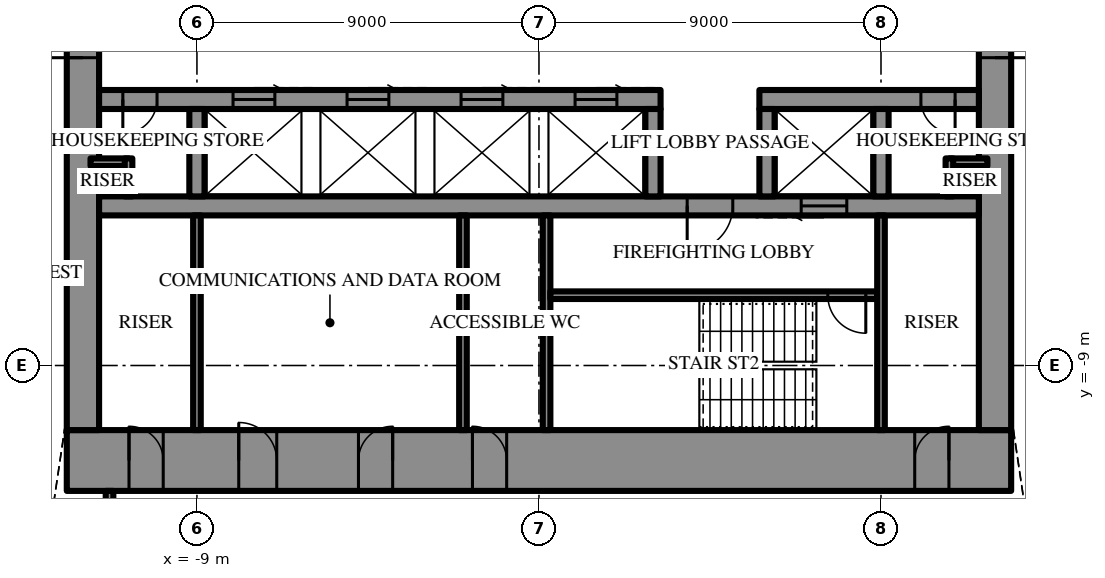
"""IFC4 building model, lengths in metres.
Left out: names, types, materials, properties, quantities, classifications, styles, units other than length and angle.
Written with IfcOpenShell. Run it as: python <this file> out.ifc"""

import sys

from ifc_helpers import new_model, si_unit, direction, frame, frame_2d, origin, place, context, subcontext, project, spatial, rectangle, extrude, element, fill, save


model = new_model("IFC4")
c1 = context("Model", 3, precision=1e-05, world=origin(), true_north=direction((0.0, 1.0)))
c2 = subcontext(c1, "Body", "Model", "MODEL_VIEW")
j1 = project(units=[si_unit("LENGTHUNIT", "METRE"), si_unit("PLANEANGLEUNIT", "RADIAN")], contexts=[c1])
p1 = place(None, origin())
s1 = spatial("IfcSite", under=j1, at=p1, CompositionType="ELEMENT")
p2 = place(p1, origin())
s2 = spatial("IfcBuilding", under=s1, at=p2, CompositionType="ELEMENT")
p3 = place(p2, frame((0.0, 0.0, 387.1)))
s3 = spatial("IfcBuildingStorey", under=s2, at=p3, CompositionType="ELEMENT", Elevation=387.1)
p4 = place(p3, frame((12.425, -11.5, 0.0), z_axis=(0.0, 0.0, 1.0), x_axis=(-1.0, 0.0, 0.0)))
e1 = element("IfcWall", 1, at=p4, inside=s3, PredefinedType="SHEAR", context=c2, shape_type="SweptSolid", body=[
    extrude(rectangle(XDim=24.85, YDim=1.6, at=frame_2d((12.425, 0.0))), origin(), (0.0, 0.0, 1.0), 4.2),
])
p5 = place(p4, frame((13.275, 0.0, 0.0)))
e2 = element("IfcOpeningElement", 2, at=p5, cuts=e1, PredefinedType="OPENING", context=c2, shape_type="SweptSolid", body=[
    extrude(rectangle(XDim=0.9, YDim=2.2, at=frame_2d((0.45, 1.1))), frame((0.0, 0.81, 0.0), z_axis=(0.0, -1.0, 0.0), x_axis=(1.0, 0.0, 0.0)), (0.0, 0.0, 1.0), 1.62),
])
p6 = place(p4, frame((16.275, 0.0, 0.0)))
e3 = element("IfcOpeningElement", 3, at=p6, cuts=e1, PredefinedType="OPENING", context=c2, shape_type="SweptSolid", body=[
    extrude(rectangle(XDim=0.9, YDim=2.2, at=frame_2d((0.45, 1.1))), frame((0.0, 0.81, 0.0), z_axis=(0.0, -1.0, 0.0), x_axis=(1.0, 0.0, 0.0)), (0.0, 0.0, 1.0), 1.62),
])
p7 = place(p4, frame((19.325, 0.0, 0.0)))
e4 = element("IfcOpeningElement", 4, at=p7, cuts=e1, PredefinedType="OPENING", context=c2, shape_type="SweptSolid", body=[
    extrude(rectangle(XDim=1.0, YDim=2.2, at=frame_2d((0.5, 1.1))), frame((0.0, 0.81, 0.0), z_axis=(0.0, -1.0, 0.0), x_axis=(1.0, 0.0, 0.0)), (0.0, 0.0, 1.0), 1.62),
])
p8 = place(p4, frame((1.637, 0.0, 0.0)))
e5 = element("IfcOpeningElement", 5, at=p8, cuts=e1, PredefinedType="OPENING", context=c2, shape_type="SweptSolid", body=[
    extrude(rectangle(XDim=0.9, YDim=2.2, at=frame_2d((0.45, 1.1))), frame((0.0, 0.81, 0.0), z_axis=(0.0, -1.0, 0.0), x_axis=(1.0, 0.0, 0.0)), (0.0, 0.0, 1.0), 1.62),
])
p9 = place(p4, frame((22.312, 0.0, 0.0)))
e6 = element("IfcOpeningElement", 6, at=p9, cuts=e1, PredefinedType="OPENING", context=c2, shape_type="SweptSolid", body=[
    extrude(rectangle(XDim=0.9, YDim=2.2, at=frame_2d((0.45, 1.1))), frame((0.0, 0.81, 0.0), z_axis=(0.0, -1.0, 0.0), x_axis=(1.0, 0.0, 0.0)), (0.0, 0.0, 1.0), 1.62),
])
p10 = place(p3, frame((12.0, -10.7, 0.0), z_axis=(0.0, 0.0, 1.0), x_axis=(0.0, 1.0, 0.0)))
e7 = element("IfcWall", 7, at=p10, inside=s3, PredefinedType="SHEAR", context=c2, shape_type="SweptSolid", body=[
    extrude(rectangle(XDim=21.4, YDim=0.85, at=frame_2d((10.7, 0.0))), origin(), (0.0, 0.0, 1.0), 4.2),
])
p11 = place(p10, frame((9.8, 0.0, 0.0)))
e8 = element("IfcOpeningElement", 8, at=p11, cuts=e7, PredefinedType="OPENING", context=c2, shape_type="SweptSolid", body=[
    extrude(rectangle(XDim=1.8, YDim=2.4, at=frame_2d((0.9, 1.2))), frame((0.0, 0.435, 0.0), z_axis=(0.0, -1.0, 0.0), x_axis=(1.0, 0.0, 0.0)), (0.0, 0.0, 1.0), 0.87),
])
p12 = place(p3, frame((-12.0, 10.7, 0.0), z_axis=(0.0, 0.0, 1.0), x_axis=(0.0, -1.0, 0.0)))
e9 = element("IfcWall", 9, at=p12, inside=s3, PredefinedType="SHEAR", context=c2, shape_type="SweptSolid", body=[
    extrude(rectangle(XDim=21.4, YDim=0.85, at=frame_2d((10.7, 0.0))), origin(), (0.0, 0.0, 1.0), 4.2),
])
p13 = place(p12, frame((9.8, 0.0, 0.0)))
e10 = element("IfcOpeningElement", 10, at=p13, cuts=e9, PredefinedType="OPENING", context=c2, shape_type="SweptSolid", body=[
    extrude(rectangle(XDim=1.8, YDim=2.4, at=frame_2d((0.9, 1.2))), frame((0.0, 0.435, 0.0), z_axis=(0.0, -1.0, 0.0), x_axis=(1.0, 0.0, 0.0)), (0.0, 0.0, 1.0), 0.87),
])
p14 = place(p3, frame((11.575, -2.0, 0.0), z_axis=(0.0, 0.0, 1.0), x_axis=(-1.0, 0.0, 0.0)))
e11 = element("IfcWall", 11, at=p14, inside=s3, PredefinedType="SHEAR", context=c2, shape_type="SweptSolid", body=[
    extrude(rectangle(XDim=5.775, YDim=0.5, at=frame_2d((2.887, 0.0))), origin(), (0.0, 0.0, 1.0), 4.2),
])
p15 = place(p14, frame((0.625, 0.0, 0.0)))
e12 = element("IfcOpeningElement", 12, at=p15, cuts=e11, PredefinedType="OPENING", context=c2, shape_type="SweptSolid", body=[
    extrude(rectangle(XDim=0.9, YDim=2.2, at=frame_2d((0.45, 1.1))), frame((0.0, 0.26, 0.0), z_axis=(0.0, -1.0, 0.0), x_axis=(1.0, 0.0, 0.0)), (0.0, 0.0, 1.0), 0.52),
])
p16 = place(p3, frame((3.2, -2.0, 0.0), z_axis=(0.0, 0.0, 1.0), x_axis=(-1.0, 0.0, 0.0)))
e13 = element("IfcWall", 13, at=p16, inside=s3, PredefinedType="SHEAR", context=c2, shape_type="SweptSolid", body=[
    extrude(rectangle(XDim=14.775, YDim=0.5, at=frame_2d((7.387, 0.0))), origin(), (0.0, 0.0, 1.0), 4.2),
])
p17 = place(p16, frame((13.25, 0.0, 0.0)))
e14 = element("IfcOpeningElement", 14, at=p17, cuts=e13, PredefinedType="OPENING", context=c2, shape_type="SweptSolid", body=[
    extrude(rectangle(XDim=0.9, YDim=2.2, at=frame_2d((0.45, 1.1))), frame((0.0, 0.26, 0.0), z_axis=(0.0, -1.0, 0.0), x_axis=(1.0, 0.0, 0.0)), (0.0, 0.0, 1.0), 0.52),
])
p18 = place(p16, frame((1.15, 0.0, 0.0)))
e15 = element("IfcOpeningElement", 15, at=p18, cuts=e13, PredefinedType="OPENING", context=c2, shape_type="SweptSolid", body=[
    extrude(rectangle(XDim=1.1, YDim=2.2, at=frame_2d((0.55, 1.1))), frame((0.0, 0.26, 0.0), z_axis=(0.0, -1.0, 0.0), x_axis=(1.0, 0.0, 0.0)), (0.0, 0.0, 1.0), 0.52),
])
p19 = place(p16, frame((4.15, 0.0, 0.0)))
e16 = element("IfcOpeningElement", 16, at=p19, cuts=e13, PredefinedType="OPENING", context=c2, shape_type="SweptSolid", body=[
    extrude(rectangle(XDim=1.1, YDim=2.2, at=frame_2d((0.55, 1.1))), frame((0.0, 0.26, 0.0), z_axis=(0.0, -1.0, 0.0), x_axis=(1.0, 0.0, 0.0)), (0.0, 0.0, 1.0), 0.52),
])
p20 = place(p16, frame((7.15, 0.0, 0.0)))
e17 = element("IfcOpeningElement", 17, at=p20, cuts=e13, PredefinedType="OPENING", context=c2, shape_type="SweptSolid", body=[
    extrude(rectangle(XDim=1.1, YDim=2.2, at=frame_2d((0.55, 1.1))), frame((0.0, 0.26, 0.0), z_axis=(0.0, -1.0, 0.0), x_axis=(1.0, 0.0, 0.0)), (0.0, 0.0, 1.0), 0.52),
])
p21 = place(p16, frame((10.15, 0.0, 0.0)))
e18 = element("IfcOpeningElement", 18, at=p21, cuts=e13, PredefinedType="OPENING", context=c2, shape_type="SweptSolid", body=[
    extrude(rectangle(XDim=1.1, YDim=2.2, at=frame_2d((0.55, 1.1))), frame((0.0, 0.26, 0.0), z_axis=(0.0, -1.0, 0.0), x_axis=(1.0, 0.0, 0.0)), (0.0, 0.0, 1.0), 0.52),
])
p22 = place(p3, frame((11.575, -4.8, 0.0), z_axis=(0.0, 0.0, 1.0), x_axis=(-1.0, 0.0, 0.0)))
e19 = element("IfcWall", 19, at=p22, inside=s3, PredefinedType="SHEAR", context=c2, shape_type="SweptSolid", body=[
    extrude(rectangle(XDim=23.15, YDim=0.5, at=frame_2d((11.575, 0.0))), origin(), (0.0, 0.0, 1.0), 4.2),
])
p23 = place(p22, frame((6.475, 0.0, 0.0)))
e20 = element("IfcOpeningElement", 20, at=p23, cuts=e19, PredefinedType="OPENING", context=c2, shape_type="SweptSolid", body=[
    extrude(rectangle(XDim=1.2, YDim=2.2, at=frame_2d((0.6, 1.1))), frame((0.0, 0.26, 0.0), z_axis=(0.0, -1.0, 0.0), x_axis=(1.0, 0.0, 0.0)), (0.0, 0.0, 1.0), 0.52),
])
p24 = place(p22, frame((3.475, 0.0, 0.0)))
e21 = element("IfcOpeningElement", 21, at=p24, cuts=e19, PredefinedType="OPENING", context=c2, shape_type="SweptSolid", body=[
    extrude(rectangle(XDim=1.2, YDim=2.2, at=frame_2d((0.6, 1.1))), frame((0.0, 0.26, 0.0), z_axis=(0.0, -1.0, 0.0), x_axis=(1.0, 0.0, 0.0)), (0.0, 0.0, 1.0), 0.52),
])
for number, where, z_axis, x_axis in (
    (22, (9.0, -2.25, 0.0), (0.0, 0.0, 1.0), (0.0, -1.0, 0.0)),
    (23, (6.0, -2.25, 0.0), (0.0, 0.0, 1.0), (0.0, -1.0, 0.0)),
    (24, (3.0, -2.25, 0.0), (0.0, 0.0, 1.0), (0.0, -1.0, 0.0)),
    (25, (-9.0, -2.25, 0.0), (0.0, 0.0, 1.0), (0.0, -1.0, 0.0)),
):
    element("IfcWall", number, at=place(p3, frame(where, z_axis=z_axis, x_axis=x_axis)), inside=s3, PredefinedType="SHEAR", context=c2, shape_type="SweptSolid", body=[
        extrude(rectangle(XDim=2.3, YDim=0.4, at=frame_2d((1.15, 0.0))), origin(), (0.0, 0.0, 1.0), 4.2),
    ])
p25 = place(p3, frame((0.2, -5.05, 0.0), z_axis=(0.0, 0.0, 1.0), x_axis=(0.0, -1.0, 0.0)))
e26 = element("IfcWall", 26, at=p25, inside=s3, PredefinedType="SHEAR", context=c2, shape_type="SweptSolid", body=[
    extrude(rectangle(XDim=5.65, YDim=0.2, at=frame_2d((2.825, 0.0))), origin(), (0.0, 0.0, 1.0), 4.2),
])
p26 = place(p3, frame((8.9, -7.15, 0.0), z_axis=(0.0, 0.0, 1.0), x_axis=(-1.0, 0.0, 0.0)))
e27 = element("IfcWall", 27, at=p26, inside=s3, PredefinedType="SHEAR", context=c2, shape_type="SweptSolid", body=[
    extrude(rectangle(XDim=8.6, YDim=0.2, at=frame_2d((4.3, 0.0))), origin(), (0.0, 0.0, 1.0), 4.2),
])
p27 = place(p26, frame((0.3, 0.0, 0.0)))
e28 = element("IfcOpeningElement", 28, at=p27, cuts=e27, PredefinedType="OPENING", context=c2, shape_type="SweptSolid", body=[
    extrude(rectangle(XDim=1.0, YDim=2.2, at=frame_2d((0.5, 1.1))), frame((0.0, 0.11, 0.0), z_axis=(0.0, -1.0, 0.0), x_axis=(1.0, 0.0, 0.0)), (0.0, 0.0, 1.0), 0.22),
])
for number, where, z_axis, x_axis in (
    (29, (9.0, -5.05, 0.0), (0.0, 0.0, 1.0), (0.0, -1.0, 0.0)),
    (30, (-9.0, -5.05, 0.0), (0.0, 0.0, 1.0), (0.0, -1.0, 0.0)),
    (31, (-2.0, -5.05, 0.0), (0.0, 0.0, 1.0), (0.0, -1.0, 0.0)),
):
    element("IfcWall", number, at=place(p3, frame(where, z_axis=z_axis, x_axis=x_axis)), inside=s3, PredefinedType="PARTITIONING", context=c2, shape_type="SweptSolid", body=[
        extrude(rectangle(XDim=5.65, YDim=0.2, at=frame_2d((2.825, 0.0))), origin(), (0.0, 0.0, 1.0), 4.0),
    ])
for number, where, z_axis, x_axis in (
    (32, (11.8, -3.65, 0.0), (0.0, 0.0, 1.0), (-1.0, 0.0, 0.0)),
    (33, (10.8, -3.55, 0.0), (0.0, 0.0, 1.0), (0.0, -1.0, 0.0)),
    (34, (-10.8, -3.65, 0.0), (0.0, 0.0, 1.0), (-1.0, 0.0, 0.0)),
    (35, (-10.8, -3.55, 0.0), (0.0, 0.0, 1.0), (0.0, -1.0, 0.0)),
):
    element("IfcWall", number, at=place(p3, frame(where, z_axis=z_axis, x_axis=x_axis)), inside=s3, PredefinedType="PARTITIONING", context=c2, shape_type="SweptSolid", body=[
        extrude(rectangle(XDim=1.0, YDim=0.2, at=frame_2d((0.5, 0.0))), origin(), (0.0, 0.0, 1.0), 4.0),
    ])
p28 = place(p3, frame((-11.3, -12.3, 0.0), z_axis=(0.0, 0.0, 1.0), x_axis=(0.0, -1.0, 0.0)))
e36 = element("IfcWall", 36, at=p28, inside=s3, PredefinedType="PARTITIONING", context=c2, shape_type="SweptSolid", body=[
    extrude(rectangle(XDim=14.25, YDim=0.2, at=frame_2d((7.125, 0.0))), origin(), (0.0, 0.0, 1.0), 4.0),
])
p29 = place(p28, frame((0.925, 0.0, 0.0)))
e37 = element("IfcOpeningElement", 37, at=p29, cuts=e36, PredefinedType="OPENING", context=c2, shape_type="SweptSolid", body=[
    extrude(rectangle(XDim=1.0, YDim=2.2, at=frame_2d((0.5, 1.1))), frame((0.0, 0.11, 0.0), z_axis=(0.0, -1.0, 0.0), x_axis=(1.0, 0.0, 0.0)), (0.0, 0.0, 1.0), 0.22),
])
p30 = place(p11, frame((1.8, 0.0, 0.0), z_axis=(0.0, 0.0, 1.0), x_axis=(-1.0, 0.0, 0.0)))
e38 = element("IfcDoor", 38, at=p30, inside=s3, OperationType="DOUBLE_DOOR_SINGLE_SWING", PredefinedType="DOOR", context=c2, shape_type="SweptSolid", body=[
    extrude(rectangle(XDim=1.8, YDim=2.4, at=frame_2d((0.9, 1.2))), frame((0.0, 0.025, 0.0), z_axis=(0.0, -1.0, 0.0), x_axis=(1.0, 0.0, 0.0)), (0.0, 0.0, 1.0), 0.05),
])
fill(e8, e38)
p31 = place(p13, frame((1.8, 0.0, 0.0), z_axis=(0.0, 0.0, 1.0), x_axis=(-1.0, 0.0, 0.0)))
e39 = element("IfcDoor", 39, at=p31, inside=s3, OperationType="DOUBLE_DOOR_SINGLE_SWING", PredefinedType="DOOR", context=c2, shape_type="SweptSolid", body=[
    extrude(rectangle(XDim=1.8, YDim=2.4, at=frame_2d((0.9, 1.2))), frame((0.0, 0.025, 0.0), z_axis=(0.0, -1.0, 0.0), x_axis=(1.0, 0.0, 0.0)), (0.0, 0.0, 1.0), 0.05),
])
fill(e10, e39)
p32 = place(p23, origin())
e40 = element("IfcDoor", 40, at=p32, inside=s3, OperationType="SINGLE_SWING_LEFT", PredefinedType="DOOR", context=c2, shape_type="SweptSolid", body=[
    extrude(rectangle(XDim=1.2, YDim=2.2, at=frame_2d((0.6, 1.1))), frame((0.0, 0.025, 0.0), z_axis=(0.0, -1.0, 0.0), x_axis=(1.0, 0.0, 0.0)), (0.0, 0.0, 1.0), 0.05),
])
fill(e20, e40)
p33 = place(p27, origin())
e41 = element("IfcDoor", 41, at=p33, inside=s3, OperationType="SINGLE_SWING_RIGHT", PredefinedType="DOOR", context=c2, shape_type="SweptSolid", body=[
    extrude(rectangle(XDim=1.0, YDim=2.2, at=frame_2d((0.5, 1.1))), frame((0.0, 0.025, 0.0), z_axis=(0.0, -1.0, 0.0), x_axis=(1.0, 0.0, 0.0)), (0.0, 0.0, 1.0), 0.05),
])
fill(e28, e41)
p34 = place(p5, frame((0.9, 0.0, 0.0), z_axis=(0.0, 0.0, 1.0), x_axis=(-1.0, 0.0, 0.0)))
e42 = element("IfcDoor", 42, at=p34, inside=s3, OperationType="SINGLE_SWING_RIGHT", PredefinedType="DOOR", context=c2, shape_type="SweptSolid", body=[
    extrude(rectangle(XDim=0.9, YDim=2.2, at=frame_2d((0.45, 1.1))), frame((0.0, 0.025, 0.0), z_axis=(0.0, -1.0, 0.0), x_axis=(1.0, 0.0, 0.0)), (0.0, 0.0, 1.0), 0.05),
])
fill(e2, e42)
p35 = place(p6, frame((0.9, 0.0, 0.0), z_axis=(0.0, 0.0, 1.0), x_axis=(-1.0, 0.0, 0.0)))
e43 = element("IfcDoor", 43, at=p35, inside=s3, OperationType="SINGLE_SWING_LEFT", PredefinedType="DOOR", context=c2, shape_type="SweptSolid", body=[
    extrude(rectangle(XDim=0.9, YDim=2.2, at=frame_2d((0.45, 1.1))), frame((0.0, 0.025, 0.0), z_axis=(0.0, -1.0, 0.0), x_axis=(1.0, 0.0, 0.0)), (0.0, 0.0, 1.0), 0.05),
])
fill(e3, e43)
p36 = place(p7, frame((1.0, 0.0, 0.0), z_axis=(0.0, 0.0, 1.0), x_axis=(-1.0, 0.0, 0.0)))
e44 = element("IfcDoor", 44, at=p36, inside=s3, OperationType="SINGLE_SWING_RIGHT", PredefinedType="DOOR", context=c2, shape_type="SweptSolid", body=[
    extrude(rectangle(XDim=1.0, YDim=2.2, at=frame_2d((0.5, 1.1))), frame((0.0, 0.025, 0.0), z_axis=(0.0, -1.0, 0.0), x_axis=(1.0, 0.0, 0.0)), (0.0, 0.0, 1.0), 0.05),
])
fill(e4, e44)
p37 = place(p8, frame((0.9, 0.0, 0.0), z_axis=(0.0, 0.0, 1.0), x_axis=(-1.0, 0.0, 0.0)))
e45 = element("IfcDoor", 45, at=p37, inside=s3, OperationType="SINGLE_SWING_LEFT", PredefinedType="DOOR", context=c2, shape_type="SweptSolid", body=[
    extrude(rectangle(XDim=0.9, YDim=2.2, at=frame_2d((0.45, 1.1))), frame((0.0, 0.025, 0.0), z_axis=(0.0, -1.0, 0.0), x_axis=(1.0, 0.0, 0.0)), (0.0, 0.0, 1.0), 0.05),
])
fill(e5, e45)
p38 = place(p9, frame((0.9, 0.0, 0.0), z_axis=(0.0, 0.0, 1.0), x_axis=(-1.0, 0.0, 0.0)))
e46 = element("IfcDoor", 46, at=p38, inside=s3, OperationType="SINGLE_SWING_RIGHT", PredefinedType="DOOR", context=c2, shape_type="SweptSolid", body=[
    extrude(rectangle(XDim=0.9, YDim=2.2, at=frame_2d((0.45, 1.1))), frame((0.0, 0.025, 0.0), z_axis=(0.0, -1.0, 0.0), x_axis=(1.0, 0.0, 0.0)), (0.0, 0.0, 1.0), 0.05),
])
fill(e6, e46)
p39 = place(p15, origin())
e47 = element("IfcDoor", 47, at=p39, inside=s3, OperationType="SINGLE_SWING_RIGHT", PredefinedType="DOOR", context=c2, shape_type="SweptSolid", body=[
    extrude(rectangle(XDim=0.9, YDim=2.2, at=frame_2d((0.45, 1.1))), frame((0.0, 0.025, 0.0), z_axis=(0.0, -1.0, 0.0), x_axis=(1.0, 0.0, 0.0)), (0.0, 0.0, 1.0), 0.05),
])
fill(e12, e47)
p40 = place(p17, origin())
e48 = element("IfcDoor", 48, at=p40, inside=s3, OperationType="SINGLE_SWING_LEFT", PredefinedType="DOOR", context=c2, shape_type="SweptSolid", body=[
    extrude(rectangle(XDim=0.9, YDim=2.2, at=frame_2d((0.45, 1.1))), frame((0.0, 0.025, 0.0), z_axis=(0.0, -1.0, 0.0), x_axis=(1.0, 0.0, 0.0)), (0.0, 0.0, 1.0), 0.05),
])
fill(e14, e48)
p41 = place(p24, origin())
e49 = element("IfcDoor", 49, at=p41, inside=s3, OperationType="SLIDING_TO_LEFT", PredefinedType="DOOR", context=c2, shape_type="SweptSolid", body=[
    extrude(rectangle(XDim=1.2, YDim=2.2, at=frame_2d((0.6, 1.1))), frame((0.0, 0.025, 0.0), z_axis=(0.0, -1.0, 0.0), x_axis=(1.0, 0.0, 0.0)), (0.0, 0.0, 1.0), 0.05),
])
fill(e21, e49)
p42 = place(p18, frame((1.1, 0.0, 0.0), z_axis=(0.0, 0.0, 1.0), x_axis=(-1.0, 0.0, 0.0)))
e50 = element("IfcDoor", 50, at=p42, inside=s3, OperationType="SLIDING_TO_LEFT", PredefinedType="DOOR", context=c2, shape_type="SweptSolid", body=[
    extrude(rectangle(XDim=1.1, YDim=2.2, at=frame_2d((0.55, 1.1))), frame((0.0, 0.025, 0.0), z_axis=(0.0, -1.0, 0.0), x_axis=(1.0, 0.0, 0.0)), (0.0, 0.0, 1.0), 0.05),
])
fill(e15, e50)
p43 = place(p19, frame((1.1, 0.0, 0.0), z_axis=(0.0, 0.0, 1.0), x_axis=(-1.0, 0.0, 0.0)))
e51 = element("IfcDoor", 51, at=p43, inside=s3, OperationType="SLIDING_TO_LEFT", PredefinedType="DOOR", context=c2, shape_type="SweptSolid", body=[
    extrude(rectangle(XDim=1.1, YDim=2.2, at=frame_2d((0.55, 1.1))), frame((0.0, 0.025, 0.0), z_axis=(0.0, -1.0, 0.0), x_axis=(1.0, 0.0, 0.0)), (0.0, 0.0, 1.0), 0.05),
])
fill(e16, e51)
p44 = place(p20, frame((1.1, 0.0, 0.0), z_axis=(0.0, 0.0, 1.0), x_axis=(-1.0, 0.0, 0.0)))
e52 = element("IfcDoor", 52, at=p44, inside=s3, OperationType="SLIDING_TO_LEFT", PredefinedType="DOOR", context=c2, shape_type="SweptSolid", body=[
    extrude(rectangle(XDim=1.1, YDim=2.2, at=frame_2d((0.55, 1.1))), frame((0.0, 0.025, 0.0), z_axis=(0.0, -1.0, 0.0), x_axis=(1.0, 0.0, 0.0)), (0.0, 0.0, 1.0), 0.05),
])
fill(e17, e52)
p45 = place(p21, frame((1.1, 0.0, 0.0), z_axis=(0.0, 0.0, 1.0), x_axis=(-1.0, 0.0, 0.0)))
e53 = element("IfcDoor", 53, at=p45, inside=s3, OperationType="SLIDING_TO_LEFT", PredefinedType="DOOR", context=c2, shape_type="SweptSolid", body=[
    extrude(rectangle(XDim=1.1, YDim=2.2, at=frame_2d((0.55, 1.1))), frame((0.0, 0.025, 0.0), z_axis=(0.0, -1.0, 0.0), x_axis=(1.0, 0.0, 0.0)), (0.0, 0.0, 1.0), 0.05),
])
fill(e18, e53)
save(model, sys.argv[1])
